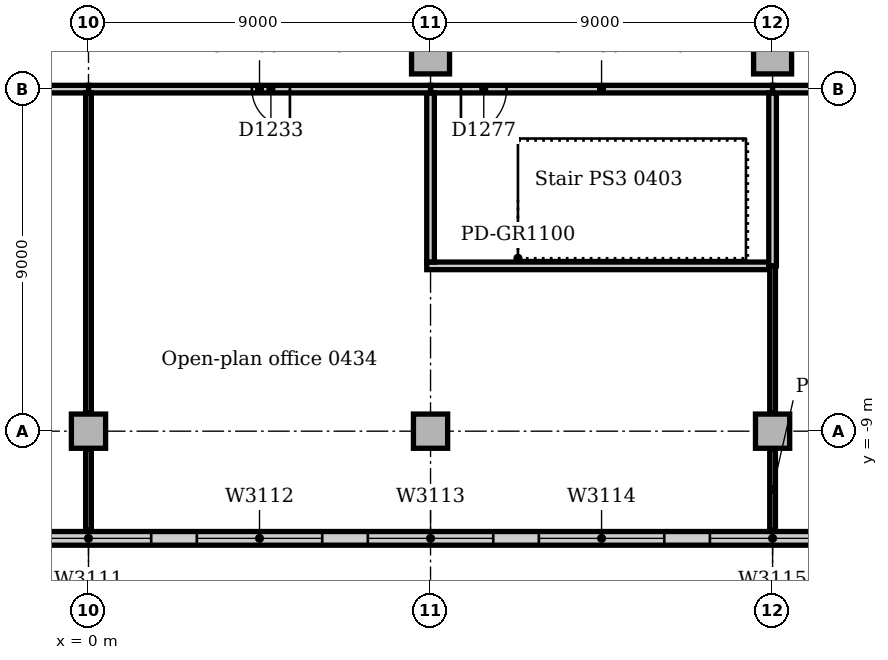
"""IFC4 building model, lengths in metres.
Left out: names, types, materials, properties, quantities, classifications, styles, units other than length and angle.
Written with IfcOpenShell. Run it as: python <this file> out.ifc"""

import sys

from ifc_helpers import new_model, si_unit, direction, frame, frame_2d, origin, origin_with_axes, origin_2d, place, context, subcontext, project, spatial, rectangle, extrude, element, fill, save


model = new_model("IFC4")
c1 = context("Model", 3, precision=1e-05, world=origin(), true_north=direction((0.0, 1.0)))
c2 = subcontext(c1, "Body", "Model", "MODEL_VIEW")
j1 = project(units=[si_unit("LENGTHUNIT", "METRE"), si_unit("PLANEANGLEUNIT", "RADIAN")], contexts=[c1])
p1 = place(None, origin())
s1 = spatial("IfcSite", under=j1, at=p1, CompositionType="ELEMENT")
p2 = place(p1, origin())
s2 = spatial("IfcBuilding", under=s1, at=p2, CompositionType="ELEMENT")
p3 = place(p2, frame((0.0, 0.0, 21.0)))
s3 = spatial("IfcBuildingStorey", under=s2, at=p3, CompositionType="ELEMENT", Elevation=21.0)
p4 = place(p3, frame((3.602, 1.453, 0.0), z_axis=(0.0, 0.0, 1.0), x_axis=(1.0, 0.0, 0.0)))
e1 = element("IfcColumn", 1, at=p4, inside=s3, PredefinedType="COLUMN", context=c2, shape_type="SweptSolid", body=[
    extrude(rectangle(XDim=1.2, YDim=1.2, at=origin_2d()), origin(), (0.0, 0.0, 1.0), 4.85),
])
for number, where, z_axis, x_axis in (
    (2, (9.0, 0.9, 0.0), (0.0, 0.0, 1.0), (1.0, 0.0, 0.0)),
    (3, (18.0, 0.9, 0.0), (0.0, 0.0, 1.0), (1.0, 0.0, 0.0)),
):
    element("IfcColumn", number, at=place(p3, frame(where, z_axis=z_axis, x_axis=x_axis)), inside=s3, PredefinedType="COLUMN", context=c2, shape_type="SweptSolid", body=[
        extrude(rectangle(XDim=1.0, YDim=1.0, at=origin_2d()), origin(), (0.0, 0.0, 1.0), 4.85),
    ])
for number, where, z_axis, x_axis in (
    (4, (0.0, -9.0, 0.0), (0.0, 0.0, 1.0), (1.0, 0.0, 0.0)),
    (5, (9.0, -9.0, 0.0), (0.0, 0.0, 1.0), (1.0, 0.0, 0.0)),
    (6, (18.0, -9.0, 0.0), (0.0, 0.0, 1.0), (1.0, 0.0, 0.0)),
):
    element("IfcColumn", number, at=place(p3, frame(where, z_axis=z_axis, x_axis=x_axis)), inside=s3, PredefinedType="COLUMN", context=c2, shape_type="SweptSolid", body=[
        extrude(rectangle(XDim=0.9, YDim=0.9, at=origin_2d()), origin(), (0.0, 0.0, 1.0), 4.7),
    ])
p5 = place(p3, frame((-81.0, -11.82, 0.0), z_axis=(0.0, 0.0, 1.0), x_axis=(1.0, 0.0, 0.0)))
e7 = element("IfcWall", 7, at=p5, inside=s3, PredefinedType="STANDARD", context=c2, shape_type="SweptSolid", body=[
    extrude(rectangle(XDim=144.0, YDim=0.36, at=frame_2d((72.0, 0.0))), origin(), (0.0, 0.0, 1.0), 4.85),
])
p6 = place(p5, frame((2.85, 0.0, 0.9)))
e8 = element("IfcOpeningElement", 8, at=p6, cuts=e7, PredefinedType="OPENING", context=c2, shape_type="SweptSolid", body=[
    extrude(rectangle(XDim=3.3, YDim=2.4, at=frame_2d((1.65, 1.2))), frame((0.0, 0.19, 0.0), z_axis=(0.0, -1.0, 0.0), x_axis=(1.0, 0.0, 0.0)), (0.0, 0.0, 1.0), 0.38),
])
p7 = place(p5, frame((7.35, 0.0, 0.9)))
e9 = element("IfcOpeningElement", 9, at=p7, cuts=e7, PredefinedType="OPENING", context=c2, shape_type="SweptSolid", body=[
    extrude(rectangle(XDim=3.3, YDim=2.4, at=frame_2d((1.65, 1.2))), frame((0.0, 0.19, 0.0), z_axis=(0.0, -1.0, 0.0), x_axis=(1.0, 0.0, 0.0)), (0.0, 0.0, 1.0), 0.38),
])
p8 = place(p5, frame((11.85, 0.0, 0.9)))
e10 = element("IfcOpeningElement", 10, at=p8, cuts=e7, PredefinedType="OPENING", context=c2, shape_type="SweptSolid", body=[
    extrude(rectangle(XDim=3.3, YDim=2.4, at=frame_2d((1.65, 1.2))), frame((0.0, 0.19, 0.0), z_axis=(0.0, -1.0, 0.0), x_axis=(1.0, 0.0, 0.0)), (0.0, 0.0, 1.0), 0.38),
])
p9 = place(p5, frame((16.35, 0.0, 0.9)))
e11 = element("IfcOpeningElement", 11, at=p9, cuts=e7, PredefinedType="OPENING", context=c2, shape_type="SweptSolid", body=[
    extrude(rectangle(XDim=3.3, YDim=2.4, at=frame_2d((1.65, 1.2))), frame((0.0, 0.19, 0.0), z_axis=(0.0, -1.0, 0.0), x_axis=(1.0, 0.0, 0.0)), (0.0, 0.0, 1.0), 0.38),
])
p10 = place(p5, frame((20.85, 0.0, 0.9)))
e12 = element("IfcOpeningElement", 12, at=p10, cuts=e7, PredefinedType="OPENING", context=c2, shape_type="SweptSolid", body=[
    extrude(rectangle(XDim=3.3, YDim=2.4, at=frame_2d((1.65, 1.2))), frame((0.0, 0.19, 0.0), z_axis=(0.0, -1.0, 0.0), x_axis=(1.0, 0.0, 0.0)), (0.0, 0.0, 1.0), 0.38),
])
p11 = place(p5, frame((25.35, 0.0, 0.9)))
e13 = element("IfcOpeningElement", 13, at=p11, cuts=e7, PredefinedType="OPENING", context=c2, shape_type="SweptSolid", body=[
    extrude(rectangle(XDim=3.3, YDim=2.4, at=frame_2d((1.65, 1.2))), frame((0.0, 0.19, 0.0), z_axis=(0.0, -1.0, 0.0), x_axis=(1.0, 0.0, 0.0)), (0.0, 0.0, 1.0), 0.38),
])
p12 = place(p5, frame((29.85, 0.0, 0.9)))
e14 = element("IfcOpeningElement", 14, at=p12, cuts=e7, PredefinedType="OPENING", context=c2, shape_type="SweptSolid", body=[
    extrude(rectangle(XDim=3.3, YDim=2.4, at=frame_2d((1.65, 1.2))), frame((0.0, 0.19, 0.0), z_axis=(0.0, -1.0, 0.0), x_axis=(1.0, 0.0, 0.0)), (0.0, 0.0, 1.0), 0.38),
])
p13 = place(p5, frame((34.35, 0.0, 0.9)))
e15 = element("IfcOpeningElement", 15, at=p13, cuts=e7, PredefinedType="OPENING", context=c2, shape_type="SweptSolid", body=[
    extrude(rectangle(XDim=3.3, YDim=2.4, at=frame_2d((1.65, 1.2))), frame((0.0, 0.19, 0.0), z_axis=(0.0, -1.0, 0.0), x_axis=(1.0, 0.0, 0.0)), (0.0, 0.0, 1.0), 0.38),
])
p14 = place(p5, frame((38.85, 0.0, 0.9)))
e16 = element("IfcOpeningElement", 16, at=p14, cuts=e7, PredefinedType="OPENING", context=c2, shape_type="SweptSolid", body=[
    extrude(rectangle(XDim=3.3, YDim=2.4, at=frame_2d((1.65, 1.2))), frame((0.0, 0.19, 0.0), z_axis=(0.0, -1.0, 0.0), x_axis=(1.0, 0.0, 0.0)), (0.0, 0.0, 1.0), 0.38),
])
p15 = place(p5, frame((43.35, 0.0, 0.9)))
e17 = element("IfcOpeningElement", 17, at=p15, cuts=e7, PredefinedType="OPENING", context=c2, shape_type="SweptSolid", body=[
    extrude(rectangle(XDim=3.3, YDim=2.4, at=frame_2d((1.65, 1.2))), frame((0.0, 0.19, 0.0), z_axis=(0.0, -1.0, 0.0), x_axis=(1.0, 0.0, 0.0)), (0.0, 0.0, 1.0), 0.38),
])
p16 = place(p5, frame((47.85, 0.0, 0.9)))
e18 = element("IfcOpeningElement", 18, at=p16, cuts=e7, PredefinedType="OPENING", context=c2, shape_type="SweptSolid", body=[
    extrude(rectangle(XDim=3.3, YDim=2.4, at=frame_2d((1.65, 1.2))), frame((0.0, 0.19, 0.0), z_axis=(0.0, -1.0, 0.0), x_axis=(1.0, 0.0, 0.0)), (0.0, 0.0, 1.0), 0.38),
])
p17 = place(p5, frame((52.35, 0.0, 0.9)))
e19 = element("IfcOpeningElement", 19, at=p17, cuts=e7, PredefinedType="OPENING", context=c2, shape_type="SweptSolid", body=[
    extrude(rectangle(XDim=3.3, YDim=2.4, at=frame_2d((1.65, 1.2))), frame((0.0, 0.19, 0.0), z_axis=(0.0, -1.0, 0.0), x_axis=(1.0, 0.0, 0.0)), (0.0, 0.0, 1.0), 0.38),
])
p18 = place(p5, frame((56.85, 0.0, 0.9)))
e20 = element("IfcOpeningElement", 20, at=p18, cuts=e7, PredefinedType="OPENING", context=c2, shape_type="SweptSolid", body=[
    extrude(rectangle(XDim=3.3, YDim=2.4, at=frame_2d((1.65, 1.2))), frame((0.0, 0.19, 0.0), z_axis=(0.0, -1.0, 0.0), x_axis=(1.0, 0.0, 0.0)), (0.0, 0.0, 1.0), 0.38),
])
p19 = place(p5, frame((61.35, 0.0, 0.9)))
e21 = element("IfcOpeningElement", 21, at=p19, cuts=e7, PredefinedType="OPENING", context=c2, shape_type="SweptSolid", body=[
    extrude(rectangle(XDim=3.3, YDim=2.4, at=frame_2d((1.65, 1.2))), frame((0.0, 0.19, 0.0), z_axis=(0.0, -1.0, 0.0), x_axis=(1.0, 0.0, 0.0)), (0.0, 0.0, 1.0), 0.38),
])
p20 = place(p5, frame((65.85, 0.0, 0.9)))
e22 = element("IfcOpeningElement", 22, at=p20, cuts=e7, PredefinedType="OPENING", context=c2, shape_type="SweptSolid", body=[
    extrude(rectangle(XDim=3.3, YDim=2.4, at=frame_2d((1.65, 1.2))), frame((0.0, 0.19, 0.0), z_axis=(0.0, -1.0, 0.0), x_axis=(1.0, 0.0, 0.0)), (0.0, 0.0, 1.0), 0.38),
])
p21 = place(p5, frame((70.35, 0.0, 0.9)))
e23 = element("IfcOpeningElement", 23, at=p21, cuts=e7, PredefinedType="OPENING", context=c2, shape_type="SweptSolid", body=[
    extrude(rectangle(XDim=3.3, YDim=2.4, at=frame_2d((1.65, 1.2))), frame((0.0, 0.19, 0.0), z_axis=(0.0, -1.0, 0.0), x_axis=(1.0, 0.0, 0.0)), (0.0, 0.0, 1.0), 0.38),
])
p22 = place(p5, frame((74.85, 0.0, 0.9)))
e24 = element("IfcOpeningElement", 24, at=p22, cuts=e7, PredefinedType="OPENING", context=c2, shape_type="SweptSolid", body=[
    extrude(rectangle(XDim=3.3, YDim=2.4, at=frame_2d((1.65, 1.2))), frame((0.0, 0.19, 0.0), z_axis=(0.0, -1.0, 0.0), x_axis=(1.0, 0.0, 0.0)), (0.0, 0.0, 1.0), 0.38),
])
p23 = place(p5, frame((79.35, 0.0, 0.9)))
e25 = element("IfcOpeningElement", 25, at=p23, cuts=e7, PredefinedType="OPENING", context=c2, shape_type="SweptSolid", body=[
    extrude(rectangle(XDim=3.3, YDim=2.4, at=frame_2d((1.65, 1.2))), frame((0.0, 0.19, 0.0), z_axis=(0.0, -1.0, 0.0), x_axis=(1.0, 0.0, 0.0)), (0.0, 0.0, 1.0), 0.38),
])
p24 = place(p5, frame((83.85, 0.0, 0.9)))
e26 = element("IfcOpeningElement", 26, at=p24, cuts=e7, PredefinedType="OPENING", context=c2, shape_type="SweptSolid", body=[
    extrude(rectangle(XDim=3.3, YDim=2.4, at=frame_2d((1.65, 1.2))), frame((0.0, 0.19, 0.0), z_axis=(0.0, -1.0, 0.0), x_axis=(1.0, 0.0, 0.0)), (0.0, 0.0, 1.0), 0.38),
])
p25 = place(p5, frame((88.35, 0.0, 0.9)))
e27 = element("IfcOpeningElement", 27, at=p25, cuts=e7, PredefinedType="OPENING", context=c2, shape_type="SweptSolid", body=[
    extrude(rectangle(XDim=3.3, YDim=2.4, at=frame_2d((1.65, 1.2))), frame((0.0, 0.19, 0.0), z_axis=(0.0, -1.0, 0.0), x_axis=(1.0, 0.0, 0.0)), (0.0, 0.0, 1.0), 0.38),
])
p26 = place(p5, frame((92.85, 0.0, 0.9)))
e28 = element("IfcOpeningElement", 28, at=p26, cuts=e7, PredefinedType="OPENING", context=c2, shape_type="SweptSolid", body=[
    extrude(rectangle(XDim=3.3, YDim=2.4, at=frame_2d((1.65, 1.2))), frame((0.0, 0.19, 0.0), z_axis=(0.0, -1.0, 0.0), x_axis=(1.0, 0.0, 0.0)), (0.0, 0.0, 1.0), 0.38),
])
p27 = place(p5, frame((97.35, 0.0, 0.9)))
e29 = element("IfcOpeningElement", 29, at=p27, cuts=e7, PredefinedType="OPENING", context=c2, shape_type="SweptSolid", body=[
    extrude(rectangle(XDim=3.3, YDim=2.4, at=frame_2d((1.65, 1.2))), frame((0.0, 0.19, 0.0), z_axis=(0.0, -1.0, 0.0), x_axis=(1.0, 0.0, 0.0)), (0.0, 0.0, 1.0), 0.38),
])
p28 = place(p5, frame((101.85, 0.0, 0.9)))
e30 = element("IfcOpeningElement", 30, at=p28, cuts=e7, PredefinedType="OPENING", context=c2, shape_type="SweptSolid", body=[
    extrude(rectangle(XDim=3.3, YDim=2.4, at=frame_2d((1.65, 1.2))), frame((0.0, 0.19, 0.0), z_axis=(0.0, -1.0, 0.0), x_axis=(1.0, 0.0, 0.0)), (0.0, 0.0, 1.0), 0.38),
])
p29 = place(p5, frame((106.35, 0.0, 0.9)))
e31 = element("IfcOpeningElement", 31, at=p29, cuts=e7, PredefinedType="OPENING", context=c2, shape_type="SweptSolid", body=[
    extrude(rectangle(XDim=3.3, YDim=2.4, at=frame_2d((1.65, 1.2))), frame((0.0, 0.19, 0.0), z_axis=(0.0, -1.0, 0.0), x_axis=(1.0, 0.0, 0.0)), (0.0, 0.0, 1.0), 0.38),
])
p30 = place(p5, frame((110.85, 0.0, 0.9)))
e32 = element("IfcOpeningElement", 32, at=p30, cuts=e7, PredefinedType="OPENING", context=c2, shape_type="SweptSolid", body=[
    extrude(rectangle(XDim=3.3, YDim=2.4, at=frame_2d((1.65, 1.2))), frame((0.0, 0.19, 0.0), z_axis=(0.0, -1.0, 0.0), x_axis=(1.0, 0.0, 0.0)), (0.0, 0.0, 1.0), 0.38),
])
p31 = place(p5, frame((115.35, 0.0, 0.9)))
e33 = element("IfcOpeningElement", 33, at=p31, cuts=e7, PredefinedType="OPENING", context=c2, shape_type="SweptSolid", body=[
    extrude(rectangle(XDim=3.3, YDim=2.4, at=frame_2d((1.65, 1.2))), frame((0.0, 0.19, 0.0), z_axis=(0.0, -1.0, 0.0), x_axis=(1.0, 0.0, 0.0)), (0.0, 0.0, 1.0), 0.38),
])
p32 = place(p5, frame((119.85, 0.0, 0.9)))
e34 = element("IfcOpeningElement", 34, at=p32, cuts=e7, PredefinedType="OPENING", context=c2, shape_type="SweptSolid", body=[
    extrude(rectangle(XDim=3.3, YDim=2.4, at=frame_2d((1.65, 1.2))), frame((0.0, 0.19, 0.0), z_axis=(0.0, -1.0, 0.0), x_axis=(1.0, 0.0, 0.0)), (0.0, 0.0, 1.0), 0.38),
])
p33 = place(p5, frame((124.35, 0.0, 0.9)))
e35 = element("IfcOpeningElement", 35, at=p33, cuts=e7, PredefinedType="OPENING", context=c2, shape_type="SweptSolid", body=[
    extrude(rectangle(XDim=3.3, YDim=2.4, at=frame_2d((1.65, 1.2))), frame((0.0, 0.19, 0.0), z_axis=(0.0, -1.0, 0.0), x_axis=(1.0, 0.0, 0.0)), (0.0, 0.0, 1.0), 0.38),
])
p34 = place(p5, frame((128.85, 0.0, 0.9)))
e36 = element("IfcOpeningElement", 36, at=p34, cuts=e7, PredefinedType="OPENING", context=c2, shape_type="SweptSolid", body=[
    extrude(rectangle(XDim=3.3, YDim=2.4, at=frame_2d((1.65, 1.2))), frame((0.0, 0.19, 0.0), z_axis=(0.0, -1.0, 0.0), x_axis=(1.0, 0.0, 0.0)), (0.0, 0.0, 1.0), 0.38),
])
p35 = place(p5, frame((133.35, 0.0, 0.9)))
e37 = element("IfcOpeningElement", 37, at=p35, cuts=e7, PredefinedType="OPENING", context=c2, shape_type="SweptSolid", body=[
    extrude(rectangle(XDim=3.3, YDim=2.4, at=frame_2d((1.65, 1.2))), frame((0.0, 0.19, 0.0), z_axis=(0.0, -1.0, 0.0), x_axis=(1.0, 0.0, 0.0)), (0.0, 0.0, 1.0), 0.38),
])
p36 = place(p5, frame((137.85, 0.0, 0.9)))
e38 = element("IfcOpeningElement", 38, at=p36, cuts=e7, PredefinedType="OPENING", context=c2, shape_type="SweptSolid", body=[
    extrude(rectangle(XDim=3.3, YDim=2.4, at=frame_2d((1.65, 1.2))), frame((0.0, 0.19, 0.0), z_axis=(0.0, -1.0, 0.0), x_axis=(1.0, 0.0, 0.0)), (0.0, 0.0, 1.0), 0.38),
])
p37 = place(p3, frame((9.0, 0.0, 0.0), z_axis=(0.0, 0.0, 1.0), x_axis=(1.0, 0.0, 0.0)))
e39 = element("IfcWall", 39, at=p37, inside=s3, PredefinedType="SOLIDWALL", context=c2, shape_type="SweptSolid", body=[
    extrude(rectangle(XDim=9.0, YDim=0.2, at=frame_2d((4.5, 0.0))), origin(), (0.0, 0.0, 1.0), 4.85),
])
p38 = place(p37, frame((0.8, 0.0, 0.0)))
e40 = element("IfcOpeningElement", 40, at=p38, cuts=e39, PredefinedType="OPENING", context=c2, shape_type="SweptSolid", body=[
    extrude(rectangle(XDim=1.2, YDim=2.1, at=frame_2d((0.6, 1.05))), frame((0.0, 0.11, 0.0), z_axis=(0.0, -1.0, 0.0), x_axis=(1.0, 0.0, 0.0)), (0.0, 0.0, 1.0), 0.22),
])
p39 = place(p3, frame((8.9, -4.65, 0.0), z_axis=(0.0, 0.0, 1.0), x_axis=(1.0, 0.0, 0.0)))
e41 = element("IfcWall", 41, at=p39, inside=s3, PredefinedType="SOLIDWALL", context=c2, shape_type="SweptSolid", body=[
    extrude(rectangle(XDim=9.0, YDim=0.2, at=frame_2d((4.5, 0.0))), origin(), (0.0, 0.0, 1.0), 4.7),
])
p40 = place(p3, frame((9.0, -4.55, 0.0), z_axis=(0.0, 0.0, 1.0), x_axis=(0.0, 1.0, 0.0)))
e42 = element("IfcWall", 42, at=p40, inside=s3, PredefinedType="SOLIDWALL", context=c2, shape_type="SweptSolid", body=[
    extrude(rectangle(XDim=4.45, YDim=0.2, at=frame_2d((2.225, 0.0))), origin(), (0.0, 0.0, 1.0), 4.7),
])
p41 = place(p3, frame((18.0, -4.65, 0.0), z_axis=(0.0, 0.0, 1.0), x_axis=(0.0, 1.0, 0.0)))
e43 = element("IfcWall", 43, at=p41, inside=s3, PredefinedType="SOLIDWALL", context=c2, shape_type="SweptSolid", body=[
    extrude(rectangle(XDim=4.55, YDim=0.2, at=frame_2d((2.275, 0.0))), origin(), (0.0, 0.0, 1.0), 4.7),
])
p42 = place(p3, origin_with_axes())
e44 = element("IfcWall", 44, at=p42, inside=s3, PredefinedType="PARTITIONING", context=c2, shape_type="SweptSolid", body=[
    extrude(rectangle(XDim=9.0, YDim=0.2, at=frame_2d((4.5, 0.0))), origin(), (0.0, 0.0, 1.0), 4.7),
])
p43 = place(p42, frame((4.3, 0.0, 0.0)))
e45 = element("IfcOpeningElement", 45, at=p43, cuts=e44, PredefinedType="OPENING", context=c2, shape_type="SweptSolid", body=[
    extrude(rectangle(XDim=1.0, YDim=2.1, at=frame_2d((0.5, 1.05))), frame((0.0, 0.11, 0.0), z_axis=(0.0, -1.0, 0.0), x_axis=(1.0, 0.0, 0.0)), (0.0, 0.0, 1.0), 0.22),
])
p44 = place(p3, frame((18.0, 0.0, 0.0), z_axis=(0.0, 0.0, 1.0), x_axis=(1.0, 0.0, 0.0)))
e46 = element("IfcWall", 46, at=p44, inside=s3, PredefinedType="PARTITIONING", context=c2, shape_type="SweptSolid", body=[
    extrude(rectangle(XDim=13.5, YDim=0.2, at=frame_2d((6.75, 0.0))), origin(), (0.0, 0.0, 1.0), 4.85),
])
p45 = place(p44, frame((6.25, 0.0, 0.0)))
e47 = element("IfcOpeningElement", 47, at=p45, cuts=e46, PredefinedType="OPENING", context=c2, shape_type="SweptSolid", body=[
    extrude(rectangle(XDim=1.0, YDim=2.1, at=frame_2d((0.5, 1.05))), frame((0.0, 0.11, 0.0), z_axis=(0.0, -1.0, 0.0), x_axis=(1.0, 0.0, 0.0)), (0.0, 0.0, 1.0), 0.22),
])
p46 = place(p3, frame((-8.53, 0.0, 0.0), z_axis=(0.0, 0.0, 1.0), x_axis=(1.0, 0.0, 0.0)))
e48 = element("IfcWall", 48, at=p46, inside=s3, PredefinedType="PARTITIONING", context=c2, shape_type="SweptSolid", body=[
    extrude(rectangle(XDim=8.53, YDim=0.2, at=frame_2d((4.265, 0.0))), origin(), (0.0, 0.0, 1.0), 4.7),
])
p47 = place(p46, frame((3.53, 0.0, 0.0)))
e49 = element("IfcOpeningElement", 49, at=p47, cuts=e48, PredefinedType="OPENING", context=c2, shape_type="SweptSolid", body=[
    extrude(rectangle(XDim=1.0, YDim=2.1, at=frame_2d((0.5, 1.05))), frame((0.0, 0.11, 0.0), z_axis=(0.0, -1.0, 0.0), x_axis=(1.0, 0.0, 0.0)), (0.0, 0.0, 1.0), 0.22),
])
p48 = place(p3, frame((0.0, -11.6, 0.0), z_axis=(0.0, 0.0, 1.0), x_axis=(0.0, 1.0, 0.0)))
e50 = element("IfcWall", 50, at=p48, inside=s3, PredefinedType="PARTITIONING", context=c2, shape_type="SweptSolid", body=[
    extrude(rectangle(XDim=2.13, YDim=0.15, at=frame_2d((1.065, 0.0))), origin(), (0.0, 0.0, 1.0), 4.7),
])
p49 = place(p3, frame((0.0, -8.53, 0.0), z_axis=(0.0, 0.0, 1.0), x_axis=(0.0, 1.0, 0.0)))
e51 = element("IfcWall", 51, at=p49, inside=s3, PredefinedType="PARTITIONING", context=c2, shape_type="SweptSolid", body=[
    extrude(rectangle(XDim=8.43, YDim=0.15, at=frame_2d((4.215, 0.0))), origin(), (0.0, 0.0, 1.0), 4.7),
])
p50 = place(p3, frame((18.0, -11.6, 0.0), z_axis=(0.0, 0.0, 1.0), x_axis=(0.0, 1.0, 0.0)))
e52 = element("IfcWall", 52, at=p50, inside=s3, PredefinedType="PARTITIONING", context=c2, shape_type="SweptSolid", body=[
    extrude(rectangle(XDim=2.13, YDim=0.15, at=frame_2d((1.065, 0.0))), origin(), (0.0, 0.0, 1.0), 4.7),
])
p51 = place(p3, frame((18.0, -8.53, 0.0), z_axis=(0.0, 0.0, 1.0), x_axis=(0.0, 1.0, 0.0)))
e53 = element("IfcWall", 53, at=p51, inside=s3, PredefinedType="PARTITIONING", context=c2, shape_type="SweptSolid", body=[
    extrude(rectangle(XDim=3.88, YDim=0.15, at=frame_2d((1.94, 0.0))), origin(), (0.0, 0.0, 1.0), 4.7),
])
p52 = place(p23, origin())
e54 = element("IfcWindow", 54, at=p52, inside=s3, PartitioningType="SINGLE_PANEL", PredefinedType="WINDOW", context=c2, shape_type="SweptSolid", body=[
    extrude(rectangle(XDim=3.3, YDim=2.4, at=frame_2d((1.65, 1.2))), frame((0.0, 0.13, 0.0), z_axis=(0.0, -1.0, 0.0), x_axis=(1.0, 0.0, 0.0)), (0.0, 0.0, 1.0), 0.06),
])
fill(e25, e54)
p53 = place(p24, origin())
e55 = element("IfcWindow", 55, at=p53, inside=s3, PartitioningType="SINGLE_PANEL", PredefinedType="WINDOW", context=c2, shape_type="SweptSolid", body=[
    extrude(rectangle(XDim=3.3, YDim=2.4, at=frame_2d((1.65, 1.2))), frame((0.0, 0.13, 0.0), z_axis=(0.0, -1.0, 0.0), x_axis=(1.0, 0.0, 0.0)), (0.0, 0.0, 1.0), 0.06),
])
fill(e26, e55)
p54 = place(p25, origin())
e56 = element("IfcWindow", 56, at=p54, inside=s3, PartitioningType="SINGLE_PANEL", PredefinedType="WINDOW", context=c2, shape_type="SweptSolid", body=[
    extrude(rectangle(XDim=3.3, YDim=2.4, at=frame_2d((1.65, 1.2))), frame((0.0, 0.13, 0.0), z_axis=(0.0, -1.0, 0.0), x_axis=(1.0, 0.0, 0.0)), (0.0, 0.0, 1.0), 0.06),
])
fill(e27, e56)
p55 = place(p26, origin())
e57 = element("IfcWindow", 57, at=p55, inside=s3, PartitioningType="SINGLE_PANEL", PredefinedType="WINDOW", context=c2, shape_type="SweptSolid", body=[
    extrude(rectangle(XDim=3.3, YDim=2.4, at=frame_2d((1.65, 1.2))), frame((0.0, 0.13, 0.0), z_axis=(0.0, -1.0, 0.0), x_axis=(1.0, 0.0, 0.0)), (0.0, 0.0, 1.0), 0.06),
])
fill(e28, e57)
p56 = place(p27, origin())
e58 = element("IfcWindow", 58, at=p56, inside=s3, PartitioningType="SINGLE_PANEL", PredefinedType="WINDOW", context=c2, shape_type="SweptSolid", body=[
    extrude(rectangle(XDim=3.3, YDim=2.4, at=frame_2d((1.65, 1.2))), frame((0.0, 0.13, 0.0), z_axis=(0.0, -1.0, 0.0), x_axis=(1.0, 0.0, 0.0)), (0.0, 0.0, 1.0), 0.06),
])
fill(e29, e58)
p57 = place(p43, frame((1.0, 0.0, 0.0), z_axis=(0.0, 0.0, 1.0), x_axis=(-1.0, 0.0, 0.0)))
e59 = element("IfcDoor", 59, at=p57, inside=s3, OperationType="SINGLE_SWING_LEFT", PredefinedType="DOOR", context=c2, shape_type="SweptSolid", body=[
    extrude(rectangle(XDim=1.0, YDim=2.1, at=frame_2d((0.5, 1.05))), frame((0.0, 0.025, 0.0), z_axis=(0.0, -1.0, 0.0), x_axis=(1.0, 0.0, 0.0)), (0.0, 0.0, 1.0), 0.05),
])
fill(e45, e59)
p58 = place(p38, frame((1.2, 0.0, 0.0), z_axis=(0.0, 0.0, 1.0), x_axis=(-1.0, 0.0, 0.0)))
e60 = element("IfcDoor", 60, at=p58, inside=s3, OperationType="SINGLE_SWING_RIGHT", PredefinedType="DOOR", context=c2, shape_type="SweptSolid", body=[
    extrude(rectangle(XDim=1.2, YDim=2.1, at=frame_2d((0.6, 1.05))), frame((0.0, 0.025, 0.0), z_axis=(0.0, -1.0, 0.0), x_axis=(1.0, 0.0, 0.0)), (0.0, 0.0, 1.0), 0.05),
])
fill(e40, e60)
save(model, sys.argv[1])
